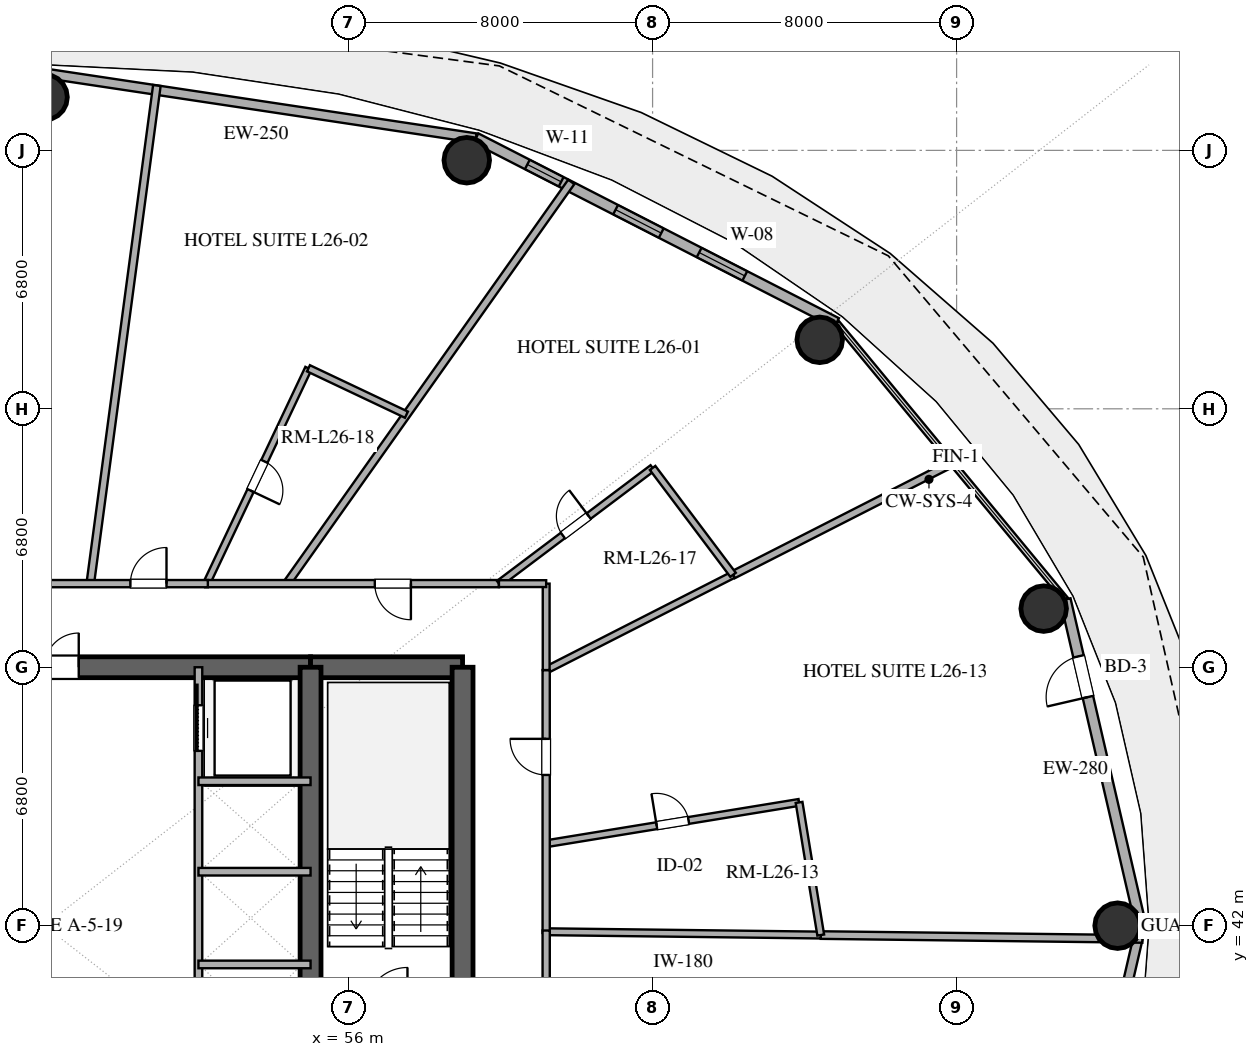
"""IFC4 building model, lengths in metres.
Left out: names, types, materials, properties, quantities, classifications, styles, units other than length and angle.
Written with IfcOpenShell. Run it as: python <this file> out.ifc"""

import sys

from ifc_helpers import new_model, si_unit, direction, frame, frame_2d, origin, origin_2d, place, context, subcontext, project, spatial, rectangle, hollow_circle, extrude, element, fill, save


model = new_model("IFC4")
c1 = context("Model", 3, precision=1e-05, world=origin(), true_north=direction((0.0, 1.0)))
c2 = subcontext(c1, "Body", "Model", "MODEL_VIEW")
j1 = project(units=[si_unit("LENGTHUNIT", "METRE"), si_unit("PLANEANGLEUNIT", "RADIAN")], contexts=[c1])
p1 = place(None, origin())
s1 = spatial("IfcSite", under=j1, at=p1, CompositionType="ELEMENT")
p2 = place(p1, origin())
s2 = spatial("IfcBuilding", under=s1, at=p2, CompositionType="ELEMENT")
p3 = place(p2, frame((0.0, 0.0, 105.6)))
s3 = spatial("IfcBuildingStorey", under=s2, at=p3, CompositionType="ELEMENT", Elevation=105.6)
p4 = place(p3, frame((41.0, 48.8, 0.0), z_axis=(0.0, 0.0, 1.0), x_axis=(1.0, 0.0, 0.0)))
e1 = element("IfcWall", 1, at=p4, inside=s3, PredefinedType="SHEAR", context=c2, shape_type="SweptSolid", body=[
    extrude(rectangle(XDim=14.0, YDim=0.55, at=frame_2d((7.0, 0.0))), origin(), (0.0, 0.0, 1.0), 3.38),
])
p5 = place(p4, frame((6.1, 0.0, 0.0)))
e2 = element("IfcOpeningElement", 2, at=p5, cuts=e1, PredefinedType="OPENING", context=c2, shape_type="SweptSolid", body=[
    extrude(rectangle(XDim=1.8, YDim=2.25, at=frame_2d((0.9, 1.125))), frame((0.0, 0.285, 0.0), z_axis=(0.0, -1.0, 0.0), x_axis=(1.0, 0.0, 0.0)), (0.0, 0.0, 1.0), 0.57),
])
p6 = place(p3, frame((55.0, 48.8, 0.0), z_axis=(0.0, 0.0, 1.0), x_axis=(1.0, 0.0, 0.0)))
e3 = element("IfcWall", 3, at=p6, inside=s3, PredefinedType="SHEAR", context=c2, shape_type="SweptSolid", body=[
    extrude(rectangle(XDim=4.0, YDim=0.55, at=frame_2d((2.0, 0.0))), origin(), (0.0, 0.0, 1.0), 3.38),
])
p7 = place(p3, frame((59.0, 35.2, 0.0), z_axis=(0.0, 0.0, 1.0), x_axis=(0.0, 1.0, 0.0)))
e4 = element("IfcWall", 4, at=p7, inside=s3, PredefinedType="SHEAR", context=c2, shape_type="SweptSolid", body=[
    extrude(rectangle(XDim=13.6, YDim=0.55, at=frame_2d((6.8, 0.0))), origin(), (0.0, 0.0, 1.0), 3.38),
])
p8 = place(p7, frame((1.5, 0.0, 0.0)))
e5 = element("IfcOpeningElement", 5, at=p8, cuts=e4, PredefinedType="OPENING", context=c2, shape_type="SweptSolid", body=[
    extrude(rectangle(XDim=1.2, YDim=2.15, at=frame_2d((0.6, 1.075))), frame((0.0, 0.285, 0.0), z_axis=(0.0, -1.0, 0.0), x_axis=(1.0, 0.0, 0.0)), (0.0, 0.0, 1.0), 0.57),
])
p9 = place(p3, frame((55.0, 35.2, 0.0), z_axis=(0.0, 0.0, 1.0), x_axis=(0.0, 1.0, 0.0)))
e6 = element("IfcWall", 6, at=p9, inside=s3, PredefinedType="SHEAR", context=c2, shape_type="SweptSolid", body=[
    extrude(rectangle(XDim=13.6, YDim=0.55, at=frame_2d((6.8, 0.0))), origin(), (0.0, 0.0, 1.0), 3.38),
])
p10 = place(p9, frame((1.15, 0.0, 0.0)))
e7 = element("IfcOpeningElement", 7, at=p10, cuts=e6, PredefinedType="OPENING", context=c2, shape_type="SweptSolid", body=[
    extrude(rectangle(XDim=1.1, YDim=2.2, at=frame_2d((0.55, 1.1))), frame((0.0, 0.285, 0.0), z_axis=(0.0, -1.0, 0.0), x_axis=(1.0, 0.0, 0.0)), (0.0, 0.0, 1.0), 0.57),
])
for number, where, z_axis, x_axis in (
    (8, (76.237, 42.0, 0.0), (0.0, 0.0, 1.0), (1.0, 0.0, 0.0)),
    (9, (74.291, 50.343, 0.0), (0.0, 0.0, 1.0), (1.0, 0.0, 0.0)),
    (10, (68.398, 57.415, 0.0), (0.0, 0.0, 1.0), (1.0, 0.0, 0.0)),
    (11, (59.11, 62.141, 0.0), (0.0, 0.0, 1.0), (1.0, 0.0, 0.0)),
    (12, (48.0, 63.8, 0.0), (0.0, 0.0, 1.0), (1.0, 0.0, 0.0)),
):
    element("IfcColumn", number, at=place(p3, frame(where, z_axis=z_axis, x_axis=x_axis)), inside=s3, PredefinedType="COLUMN", context=c2, shape_type="SweptSolid", body=[
        extrude(hollow_circle(Radius=0.6, WallThickness=0.032, at=origin_2d()), origin(), (0.0, 0.0, 1.0), 3.38),
    ])
p11 = place(p3, frame((76.849, 42.0, 0.0), z_axis=(0.0, 0.0, 1.0), x_axis=(-0.22558597182, 0.974223264616, 0.0)))
e13 = element("IfcWall", 13, at=p11, inside=s3, PredefinedType="SOLIDWALL", context=c2, shape_type="SweptSolid", body=[
    extrude(rectangle(XDim=8.811, YDim=0.28, at=frame_2d((4.405, 0.0))), origin(), (0.0, 0.0, 1.0), 3.38),
])
p12 = place(p11, frame((6.175, 0.0, 0.0)))
e14 = element("IfcOpeningElement", 14, at=p12, cuts=e13, PredefinedType="OPENING", context=c2, shape_type="SweptSolid", body=[
    extrude(rectangle(XDim=1.1, YDim=2.25, at=frame_2d((0.55, 1.125))), frame((0.0, 0.15, 0.0), z_axis=(0.0, -1.0, 0.0), x_axis=(1.0, 0.0, 0.0)), (0.0, 0.0, 1.0), 0.3),
])
p13 = place(p3, frame((68.84, 57.86, 0.0), z_axis=(0.0, 0.0, 1.0), x_axis=(-0.889959505023, 0.45603955905, 0.0)))
e15 = element("IfcWall", 15, at=p13, inside=s3, PredefinedType="SOLIDWALL", context=c2, shape_type="SweptSolid", body=[
    extrude(rectangle(XDim=10.662, YDim=0.28, at=frame_2d((5.331, 0.0))), origin(), (0.0, 0.0, 1.0), 3.38),
])
p14 = place(p13, frame((2.711, 0.0, 0.85)))
e16 = element("IfcOpeningElement", 16, at=p14, cuts=e15, PredefinedType="OPENING", context=c2, shape_type="SweptSolid", body=[
    extrude(rectangle(XDim=1.35, YDim=1.8, at=frame_2d((0.675, 0.9))), frame((0.0, 0.15, 0.0), z_axis=(0.0, -1.0, 0.0), x_axis=(1.0, 0.0, 0.0)), (0.0, 0.0, 1.0), 0.3),
])
p15 = place(p13, frame((5.182, 0.0, 0.85)))
e17 = element("IfcOpeningElement", 17, at=p15, cuts=e15, PredefinedType="OPENING", context=c2, shape_type="SweptSolid", body=[
    extrude(rectangle(XDim=1.35, YDim=1.8, at=frame_2d((0.675, 0.9))), frame((0.0, 0.15, 0.0), z_axis=(0.0, -1.0, 0.0), x_axis=(1.0, 0.0, 0.0)), (0.0, 0.0, 1.0), 0.3),
])
p16 = place(p13, frame((8.142, 0.0, 0.85)))
e18 = element("IfcOpeningElement", 18, at=p16, cuts=e15, PredefinedType="OPENING", context=c2, shape_type="SweptSolid", body=[
    extrude(rectangle(XDim=1.0, YDim=1.8, at=frame_2d((0.5, 0.9))), frame((0.0, 0.15, 0.0), z_axis=(0.0, -1.0, 0.0), x_axis=(1.0, 0.0, 0.0)), (0.0, 0.0, 1.0), 0.3),
])
p17 = place(p3, frame((59.351, 62.723, 0.0), z_axis=(0.0, 0.0, 1.0), x_axis=(-0.988877774656, 0.148730450117, 0.0)))
e19 = element("IfcWall", 19, at=p17, inside=s3, PredefinedType="SOLIDWALL", context=c2, shape_type="SweptSolid", body=[
    extrude(rectangle(XDim=11.479, YDim=0.25, at=frame_2d((5.74, 0.0))), origin(), (0.0, 0.0, 1.0), 3.38),
])
p18 = place(p3, frame((74.861, 33.417, 0.0), z_axis=(0.0, 0.0, 1.0), x_axis=(0.22558597182, 0.974223264616, 0.0)))
e20 = element("IfcWall", 20, at=p18, inside=s3, PredefinedType="SOLIDWALL", context=c2, shape_type="SweptSolid", body=[
    extrude(rectangle(XDim=8.811, YDim=0.25, at=frame_2d((4.405, 0.0))), origin(), (0.0, 0.0, 1.0), 3.38),
])
p19 = place(p3, frame((52.05, 38.4, 0.0), z_axis=(0.0, 0.0, 1.0), x_axis=(0.0, 1.0, 0.0)))
e21 = element("IfcWall", 21, at=p19, inside=s3, PredefinedType="SOLIDWALL", context=c2, shape_type="SweptSolid", body=[
    extrude(rectangle(XDim=10.4, YDim=0.2, at=frame_2d((5.2, 0.0))), origin(), (0.0, 0.0, 1.0), 2.74),
])
p20 = place(p19, frame((8.2, 0.0, 0.0)))
e22 = element("IfcOpeningElement", 22, at=p20, cuts=e21, PredefinedType="OPENING", context=c2, shape_type="SweptSolid", body=[
    extrude(rectangle(XDim=1.2, YDim=2.2, at=frame_2d((0.6, 1.1))), frame((0.0, 0.11, 0.0), z_axis=(0.0, -1.0, 0.0), x_axis=(1.0, 0.0, 0.0)), (0.0, 0.0, 1.0), 0.22),
])
for number, where, z_axis, x_axis in (
    (23, (52.05, 40.98, 0.0), (0.0, 0.0, 1.0), (1.0, 0.0, 0.0)),
    (24, (52.05, 43.42, 0.0), (0.0, 0.0, 1.0), (1.0, 0.0, 0.0)),
    (25, (52.05, 45.8, 0.0), (0.0, 0.0, 1.0), (1.0, 0.0, 0.0)),
):
    element("IfcWall", number, at=place(p3, frame(where, z_axis=z_axis, x_axis=x_axis)), inside=s3, PredefinedType="SOLIDWALL", context=c2, shape_type="SweptSolid", body=[
        extrude(rectangle(XDim=2.95, YDim=0.2, at=frame_2d((1.475, 0.0))), origin(), (0.0, 0.0, 1.0), 2.74),
    ])
p21 = place(p3, frame((50.956, 64.107, 0.0), z_axis=(0.0, 0.0, 1.0), x_axis=(-0.132526518831, -0.99117945994, 0.0)))
e26 = element("IfcWall", 26, at=p21, inside=s3, PredefinedType="PARTITIONING", context=c2, shape_type="SweptSolid", body=[
    extrude(rectangle(XDim=13.223, YDim=0.2, at=frame_2d((6.612, 0.0))), origin(), (0.0, 0.0, 1.0), 2.74),
])
p22 = place(p3, frame((76.888, 41.651, 0.0), z_axis=(0.0, 0.0, 1.0), x_axis=(-0.9999269672, 0.012085539541, 0.0)))
e27 = element("IfcWall", 27, at=p22, inside=s3, PredefinedType="PARTITIONING", context=c2, shape_type="SweptSolid", body=[
    extrude(rectangle(XDim=8.464, YDim=0.2, at=frame_2d((4.232, 0.0))), origin(), (0.0, 0.0, 1.0), 2.74),
])
p23 = place(p3, frame((54.374, 51.0, 0.0), z_axis=(0.0, 0.0, 1.0), x_axis=(0.577967135411, 0.816060040919, 0.0)))
e28 = element("IfcWall", 28, at=p23, inside=s3, PredefinedType="PARTITIONING", context=c2, shape_type="SweptSolid", body=[
    extrude(rectangle(XDim=12.953, YDim=0.2, at=frame_2d((6.477, 0.0))), origin(), (0.0, 0.0, 1.0), 2.74),
])
p24 = place(p3, frame((68.425, 41.753, 0.0), z_axis=(0.0, 0.0, 1.0), x_axis=(-0.999926833816, 0.012096570355, 0.0)))
e29 = element("IfcWall", 29, at=p24, inside=s3, PredefinedType="PLUMBINGWALL", context=c2, shape_type="SweptSolid", body=[
    extrude(rectangle(XDim=7.225, YDim=0.18, at=frame_2d((3.613, 0.0))), origin(), (0.0, 0.0, 1.0), 2.74),
])
p25 = place(p3, frame((61.2, 44.156, 0.0), z_axis=(0.0, 0.0, 1.0), x_axis=(0.986917247844, 0.161227621419, 0.0)))
e30 = element("IfcWall", 30, at=p25, inside=s3, PredefinedType="PLUMBINGWALL", context=c2, shape_type="SweptSolid", body=[
    extrude(rectangle(XDim=6.743, YDim=0.18, at=frame_2d((3.372, 0.0))), origin(), (0.0, 0.0, 1.0), 2.74),
])
p26 = place(p25, frame((2.946, 0.0, 0.0)))
e31 = element("IfcOpeningElement", 31, at=p26, cuts=e30, PredefinedType="OPENING", context=c2, shape_type="SweptSolid", body=[
    extrude(rectangle(XDim=0.85, YDim=2.1, at=frame_2d((0.425, 1.05))), frame((0.0, 0.1, 0.0), z_axis=(0.0, -1.0, 0.0), x_axis=(1.0, 0.0, 0.0)), (0.0, 0.0, 1.0), 0.2),
])
p27 = place(p3, frame((71.998, 54.228, 0.0), z_axis=(0.0, 0.0, 1.0), x_axis=(-0.891005333778, -0.453992836044, 0.0)))
e32 = element("IfcWall", 32, at=p27, inside=s3, PredefinedType="PARTITIONING", context=c2, shape_type="SweptSolid", body=[
    extrude(rectangle(XDim=6.599, YDim=0.2, at=frame_2d((3.3, 0.0))), origin(), (0.0, 0.0, 1.0), 2.74),
])
p28 = place(p3, frame((54.945, 56.666, 0.0), z_axis=(0.0, 0.0, 1.0), x_axis=(-0.427935680108, -0.903809190975, 0.0)))
e33 = element("IfcWall", 33, at=p28, inside=s3, PredefinedType="PLUMBINGWALL", context=c2, shape_type="SweptSolid", body=[
    extrude(rectangle(XDim=6.269, YDim=0.18, at=frame_2d((3.135, 0.0))), origin(), (0.0, 0.0, 1.0), 2.74),
])
p29 = place(p28, frame((2.71, 0.0, 0.0)))
e34 = element("IfcOpeningElement", 34, at=p29, cuts=e33, PredefinedType="OPENING", context=c2, shape_type="SweptSolid", body=[
    extrude(rectangle(XDim=0.85, YDim=2.1, at=frame_2d((0.425, 1.05))), frame((0.0, 0.1, 0.0), z_axis=(0.0, -1.0, 0.0), x_axis=(1.0, 0.0, 0.0)), (0.0, 0.0, 1.0), 0.2),
])
p30 = place(p3, frame((59.957, 51.0, 0.0), z_axis=(0.0, 0.0, 1.0), x_axis=(-1.0, 0.0, 0.0)))
e35 = element("IfcWall", 35, at=p30, inside=s3, PredefinedType="PARTITIONING", context=c2, shape_type="SweptSolid", body=[
    extrude(rectangle(XDim=7.73, YDim=0.19, at=frame_2d((3.865, 0.0))), origin(), (0.0, 0.0, 1.0), 2.74),
])
p31 = place(p30, frame((2.316, 0.0, 0.0)))
e36 = element("IfcOpeningElement", 36, at=p31, cuts=e35, PredefinedType="OPENING", context=c2, shape_type="SweptSolid", body=[
    extrude(rectangle(XDim=0.95, YDim=2.15, at=frame_2d((0.475, 1.075))), frame((0.0, 0.105, 0.0), z_axis=(0.0, -1.0, 0.0), x_axis=(1.0, 0.0, 0.0)), (0.0, 0.0, 1.0), 0.21),
])
p32 = place(p3, frame((66.118, 51.231, 0.0), z_axis=(0.0, 0.0, 1.0), x_axis=(-0.891004388837, -0.453994690579, 0.0)))
e37 = element("IfcWall", 37, at=p32, inside=s3, PredefinedType="PLUMBINGWALL", context=c2, shape_type="SweptSolid", body=[
    extrude(rectangle(XDim=5.52, YDim=0.18, at=frame_2d((2.76, 0.0))), origin(), (0.0, 0.0, 1.0), 2.74),
])
p33 = place(p3, frame((59.957, 51.0, 0.0), z_axis=(0.0, 0.0, 1.0), x_axis=(0.798951197172, 0.601395863419, 0.0)))
e38 = element("IfcWall", 38, at=p33, inside=s3, PredefinedType="PLUMBINGWALL", context=c2, shape_type="SweptSolid", body=[
    extrude(rectangle(XDim=5.062, YDim=0.18, at=frame_2d((2.531, 0.0))), origin(), (0.0, 0.0, 1.0), 2.74),
])
p34 = place(p33, frame((2.106, 0.0, 0.0)))
e39 = element("IfcOpeningElement", 39, at=p34, cuts=e38, PredefinedType="OPENING", context=c2, shape_type="SweptSolid", body=[
    extrude(rectangle(XDim=0.85, YDim=2.1, at=frame_2d((0.425, 1.05))), frame((0.0, 0.1, 0.0), z_axis=(0.0, -1.0, 0.0), x_axis=(1.0, 0.0, 0.0)), (0.0, 0.0, 1.0), 0.2),
])
p35 = place(p3, frame((61.2, 41.809, 0.0), z_axis=(0.0, 0.0, 1.0), x_axis=(0.0, 1.0, 0.0)))
e40 = element("IfcWall", 40, at=p35, inside=s3, PredefinedType="PARTITIONING", context=c2, shape_type="SweptSolid", body=[
    extrude(rectangle(XDim=6.917, YDim=0.19, at=frame_2d((3.458, 0.0))), origin(), (0.0, 0.0, 1.0), 2.74),
])
p36 = place(p35, frame((4.157, 0.0, 0.0)))
e41 = element("IfcOpeningElement", 41, at=p36, cuts=e40, PredefinedType="OPENING", context=c2, shape_type="SweptSolid", body=[
    extrude(rectangle(XDim=0.95, YDim=2.15, at=frame_2d((0.475, 1.075))), frame((0.0, 0.105, 0.0), z_axis=(0.0, -1.0, 0.0), x_axis=(1.0, 0.0, 0.0)), (0.0, 0.0, 1.0), 0.21),
])
p37 = place(p3, frame((44.677, 51.0, 0.0), z_axis=(0.0, 0.0, 1.0), x_axis=(1.0, 0.0, 0.0)))
e42 = element("IfcWall", 42, at=p37, inside=s3, PredefinedType="PARTITIONING", context=c2, shape_type="SweptSolid", body=[
    extrude(rectangle(XDim=7.621, YDim=0.19, at=frame_2d((3.81, 0.0))), origin(), (0.0, 0.0, 1.0), 2.74),
])
p38 = place(p37, frame((1.78, 0.0, 0.0)))
e43 = element("IfcOpeningElement", 43, at=p38, cuts=e42, PredefinedType="OPENING", context=c2, shape_type="SweptSolid", body=[
    extrude(rectangle(XDim=1.0, YDim=2.2, at=frame_2d((0.5, 1.1))), frame((0.0, 0.105, 0.0), z_axis=(0.0, -1.0, 0.0), x_axis=(1.0, 0.0, 0.0)), (0.0, 0.0, 1.0), 0.21),
])
p39 = place(p37, frame((5.583, 0.0, 0.0)))
e44 = element("IfcOpeningElement", 44, at=p39, cuts=e42, PredefinedType="OPENING", context=c2, shape_type="SweptSolid", body=[
    extrude(rectangle(XDim=0.95, YDim=2.15, at=frame_2d((0.475, 1.075))), frame((0.0, 0.105, 0.0), z_axis=(0.0, -1.0, 0.0), x_axis=(1.0, 0.0, 0.0)), (0.0, 0.0, 1.0), 0.21),
])
p40 = place(p3, frame((61.2, 41.873, 0.0), z_axis=(0.0, 0.0, 1.0), x_axis=(0.0, -1.0, 0.0)))
e45 = element("IfcWall", 45, at=p40, inside=s3, PredefinedType="PARTITIONING", context=c2, shape_type="SweptSolid", body=[
    extrude(rectangle(XDim=8.873, YDim=0.19, at=frame_2d((4.436, 0.0))), origin(), (0.0, 0.0, 1.0), 2.74),
])
p41 = place(p40, frame((1.676, 0.0, 0.0)))
e46 = element("IfcOpeningElement", 46, at=p41, cuts=e45, PredefinedType="OPENING", context=c2, shape_type="SweptSolid", body=[
    extrude(rectangle(XDim=0.95, YDim=2.15, at=frame_2d((0.475, 1.075))), frame((0.0, 0.105, 0.0), z_axis=(0.0, -1.0, 0.0), x_axis=(1.0, 0.0, 0.0)), (0.0, 0.0, 1.0), 0.21),
])
p42 = place(p3, frame((67.855, 45.243, 0.0), z_axis=(0.0, 0.0, 1.0), x_axis=(0.161207379819, -0.986920554397, 0.0)))
e47 = element("IfcWall", 47, at=p42, inside=s3, PredefinedType="PLUMBINGWALL", context=c2, shape_type="SweptSolid", body=[
    extrude(rectangle(XDim=3.536, YDim=0.18, at=frame_2d((1.768, 0.0))), origin(), (0.0, 0.0, 1.0), 2.74),
])
p43 = place(p3, frame((64.001, 54.044, 0.0), z_axis=(0.0, 0.0, 1.0), x_axis=(0.601341788725, -0.79899189804, 0.0)))
e48 = element("IfcWall", 48, at=p43, inside=s3, PredefinedType="PLUMBINGWALL", context=c2, shape_type="SweptSolid", body=[
    extrude(rectangle(XDim=3.52, YDim=0.18, at=frame_2d((1.76, 0.0))), origin(), (0.0, 0.0, 1.0), 2.74),
])
p44 = place(p3, frame((57.523, 55.446, 0.0), z_axis=(0.0, 0.0, 1.0), x_axis=(-0.90380753646, 0.42793917446, 0.0)))
e49 = element("IfcWall", 49, at=p44, inside=s3, PredefinedType="PLUMBINGWALL", context=c2, shape_type="SweptSolid", body=[
    extrude(rectangle(XDim=2.853, YDim=0.18, at=frame_2d((1.426, 0.0))), origin(), (0.0, 0.0, 1.0), 2.74),
])
p45 = place(p3, frame((61.2, 48.726, 0.0), z_axis=(0.0, 0.0, 1.0), x_axis=(0.0, 1.0, 0.0)))
e50 = element("IfcWall", 50, at=p45, inside=s3, PredefinedType="PLUMBINGWALL", context=c2, shape_type="SweptSolid", body=[
    extrude(rectangle(XDim=2.274, YDim=0.18, at=frame_2d((1.137, 0.0))), origin(), (0.0, 0.0, 1.0), 2.74),
])
p46 = place(p3, frame((61.2, 51.0, 0.0), z_axis=(0.0, 0.0, 1.0), x_axis=(-1.0, 0.0, 0.0)))
e51 = element("IfcWall", 51, at=p46, inside=s3, PredefinedType="PLUMBINGWALL", context=c2, shape_type="SweptSolid", body=[
    extrude(rectangle(XDim=1.243, YDim=0.18, at=frame_2d((0.622, 0.0))), origin(), (0.0, 0.0, 1.0), 2.74),
])
p47 = place(p12, origin())
e52 = element("IfcDoor", 52, at=p47, inside=s3, OperationType="SINGLE_SWING_LEFT", PredefinedType="DOOR", context=c2, shape_type="SweptSolid", body=[
    extrude(rectangle(XDim=1.1, YDim=2.25, at=frame_2d((0.55, 1.125))), frame((0.0, 0.025, 0.0), z_axis=(0.0, -1.0, 0.0), x_axis=(1.0, 0.0, 0.0)), (0.0, 0.0, 1.0), 0.05),
])
fill(e14, e52)
p48 = place(p14, origin())
e53 = element("IfcWindow", 53, at=p48, inside=s3, PartitioningType="SINGLE_PANEL", PredefinedType="WINDOW", context=c2, shape_type="SweptSolid", body=[
    extrude(rectangle(XDim=1.35, YDim=1.8, at=frame_2d((0.675, 0.9))), frame((0.0, 0.03, 0.0), z_axis=(0.0, -1.0, 0.0), x_axis=(1.0, 0.0, 0.0)), (0.0, 0.0, 1.0), 0.06),
])
fill(e16, e53)
p49 = place(p15, origin())
e54 = element("IfcWindow", 54, at=p49, inside=s3, PartitioningType="SINGLE_PANEL", PredefinedType="WINDOW", context=c2, shape_type="SweptSolid", body=[
    extrude(rectangle(XDim=1.35, YDim=1.8, at=frame_2d((0.675, 0.9))), frame((0.0, 0.03, 0.0), z_axis=(0.0, -1.0, 0.0), x_axis=(1.0, 0.0, 0.0)), (0.0, 0.0, 1.0), 0.06),
])
fill(e17, e54)
p50 = place(p16, origin())
e55 = element("IfcWindow", 55, at=p50, inside=s3, PartitioningType="SINGLE_PANEL", PredefinedType="WINDOW", context=c2, shape_type="SweptSolid", body=[
    extrude(rectangle(XDim=1.0, YDim=1.8, at=frame_2d((0.5, 0.9))), frame((0.0, 0.03, 0.0), z_axis=(0.0, -1.0, 0.0), x_axis=(1.0, 0.0, 0.0)), (0.0, 0.0, 1.0), 0.06),
])
fill(e18, e55)
p51 = place(p5, origin())
e56 = element("IfcDoor", 56, at=p51, inside=s3, OperationType="DOUBLE_DOOR_SINGLE_SWING", PredefinedType="DOOR", context=c2, shape_type="SweptSolid", body=[
    extrude(rectangle(XDim=1.8, YDim=2.25, at=frame_2d((0.9, 1.125))), frame((0.0, 0.025, 0.0), z_axis=(0.0, -1.0, 0.0), x_axis=(1.0, 0.0, 0.0)), (0.0, 0.0, 1.0), 0.05),
])
fill(e2, e56)
p52 = place(p20, origin())
e57 = element("IfcDoor", 57, at=p52, inside=s3, OperationType="SLIDING_TO_RIGHT", PredefinedType="DOOR", context=c2, shape_type="SweptSolid", body=[
    extrude(rectangle(XDim=1.2, YDim=2.2, at=frame_2d((0.6, 1.1))), frame((0.0, 0.025, 0.0), z_axis=(0.0, -1.0, 0.0), x_axis=(1.0, 0.0, 0.0)), (0.0, 0.0, 1.0), 0.05),
])
fill(e22, e57)
p53 = place(p26, origin())
e58 = element("IfcDoor", 58, at=p53, inside=s3, OperationType="SINGLE_SWING_LEFT", PredefinedType="DOOR", context=c2, shape_type="SweptSolid", body=[
    extrude(rectangle(XDim=0.85, YDim=2.1, at=frame_2d((0.425, 1.05))), frame((0.0, 0.025, 0.0), z_axis=(0.0, -1.0, 0.0), x_axis=(1.0, 0.0, 0.0)), (0.0, 0.0, 1.0), 0.05),
])
fill(e31, e58)
p54 = place(p29, origin())
e59 = element("IfcDoor", 59, at=p54, inside=s3, OperationType="SINGLE_SWING_RIGHT", PredefinedType="DOOR", context=c2, shape_type="SweptSolid", body=[
    extrude(rectangle(XDim=0.85, YDim=2.1, at=frame_2d((0.425, 1.05))), frame((0.0, 0.025, 0.0), z_axis=(0.0, -1.0, 0.0), x_axis=(1.0, 0.0, 0.0)), (0.0, 0.0, 1.0), 0.05),
])
fill(e34, e59)
p55 = place(p31, origin())
e60 = element("IfcDoor", 60, at=p55, inside=s3, OperationType="SINGLE_SWING_LEFT", PredefinedType="DOOR", context=c2, shape_type="SweptSolid", body=[
    extrude(rectangle(XDim=0.95, YDim=2.15, at=frame_2d((0.475, 1.075))), frame((0.0, 0.025, 0.0), z_axis=(0.0, -1.0, 0.0), x_axis=(1.0, 0.0, 0.0)), (0.0, 0.0, 1.0), 0.05),
])
fill(e36, e60)
p56 = place(p34, origin())
e61 = element("IfcDoor", 61, at=p56, inside=s3, OperationType="SINGLE_SWING_RIGHT", PredefinedType="DOOR", context=c2, shape_type="SweptSolid", body=[
    extrude(rectangle(XDim=0.85, YDim=2.1, at=frame_2d((0.425, 1.05))), frame((0.0, 0.025, 0.0), z_axis=(0.0, -1.0, 0.0), x_axis=(1.0, 0.0, 0.0)), (0.0, 0.0, 1.0), 0.05),
])
fill(e39, e61)
p57 = place(p36, origin())
e62 = element("IfcDoor", 62, at=p57, inside=s3, OperationType="SINGLE_SWING_RIGHT", PredefinedType="DOOR", context=c2, shape_type="SweptSolid", body=[
    extrude(rectangle(XDim=0.95, YDim=2.15, at=frame_2d((0.475, 1.075))), frame((0.0, 0.025, 0.0), z_axis=(0.0, -1.0, 0.0), x_axis=(1.0, 0.0, 0.0)), (0.0, 0.0, 1.0), 0.05),
])
fill(e41, e62)
p58 = place(p39, origin())
e63 = element("IfcDoor", 63, at=p58, inside=s3, OperationType="SINGLE_SWING_RIGHT", PredefinedType="DOOR", context=c2, shape_type="SweptSolid", body=[
    extrude(rectangle(XDim=0.95, YDim=2.15, at=frame_2d((0.475, 1.075))), frame((0.0, 0.025, 0.0), z_axis=(0.0, -1.0, 0.0), x_axis=(1.0, 0.0, 0.0)), (0.0, 0.0, 1.0), 0.05),
])
fill(e44, e63)
save(model, sys.argv[1])
